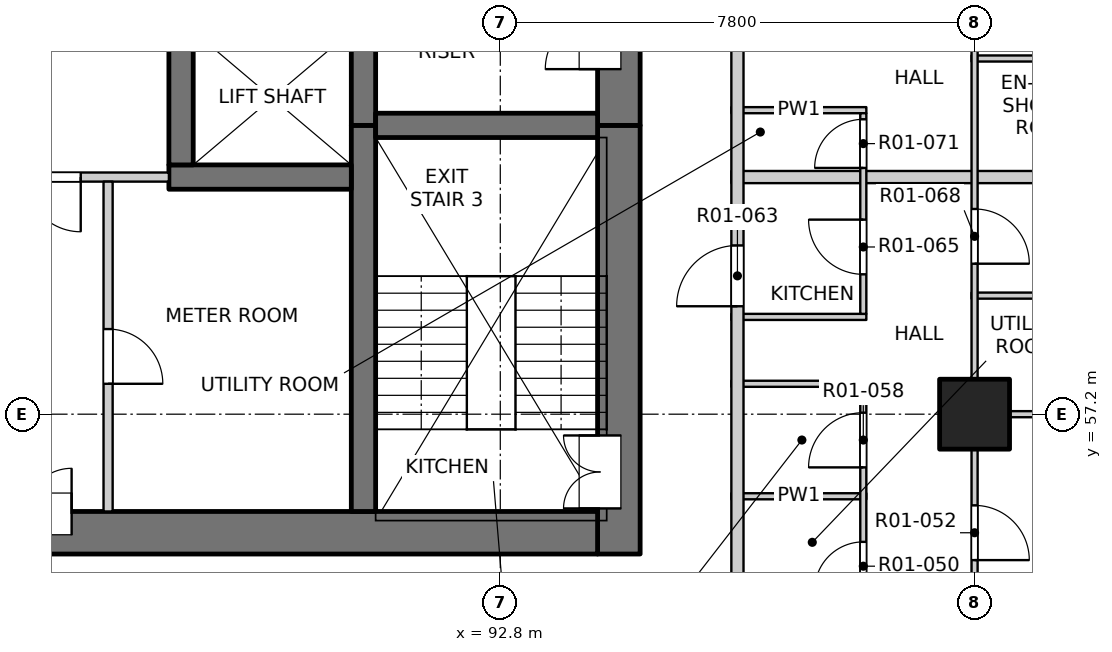
"""IFC4 building model, lengths in metres.
Left out: names, types, materials, properties, quantities, classifications, styles, units other than length and angle.
Written with IfcOpenShell. Run it as: python <this file> out.ifc"""

import sys

from ifc_helpers import new_model, si_unit, direction, frame, frame_2d, origin, origin_2d, place, context, subcontext, project, spatial, rectangle, extrude, element, fill, save


model = new_model("IFC4")
c1 = context("Model", 3, precision=1e-05, world=origin(), true_north=direction((0.0, 1.0)))
c2 = subcontext(c1, "Body", "Model", "MODEL_VIEW")
j1 = project(units=[si_unit("LENGTHUNIT", "METRE"), si_unit("PLANEANGLEUNIT", "RADIAN")], contexts=[c1])
p1 = place(None, origin())
s1 = spatial("IfcSite", under=j1, at=p1, CompositionType="ELEMENT")
p2 = place(p1, origin())
s2 = spatial("IfcBuilding", under=s1, at=p2, CompositionType="ELEMENT")
p3 = place(p2, frame((0.0, 0.0, 26.3)))
s3 = spatial("IfcBuildingStorey", under=s2, at=p3, CompositionType="ELEMENT", Elevation=26.3)
p4 = place(p3, frame((100.6, 57.2, -0.25), z_axis=(0.0, 0.0, 1.0), x_axis=(1.0, 0.0, 0.0)))
e1 = element("IfcColumn", 1, at=p4, inside=s3, PredefinedType="COLUMN", context=c2, shape_type="SweptSolid", body=[
    extrude(rectangle(XDim=1.15, YDim=1.15, at=origin_2d()), origin(), (0.0, 0.0, 1.0), 3.4),
])
p5 = place(p3, frame((94.75, 54.9, -0.25), z_axis=(0.0, 0.0, 1.0), x_axis=(0.0, 1.0, 0.0)))
e2 = element("IfcWall", 2, at=p5, inside=s3, PredefinedType="SOLIDWALL", context=c2, shape_type="SweptSolid", body=[
    extrude(rectangle(XDim=7.05, YDim=0.7, at=frame_2d((3.525, 0.0))), origin(), (0.0, 0.0, 1.0), 3.4),
])
p6 = place(p5, frame((0.75, 0.0, 0.25)))
e3 = element("IfcOpeningElement", 3, at=p6, cuts=e2, PredefinedType="OPENING", context=c2, shape_type="SweptSolid", body=[
    extrude(rectangle(XDim=1.2, YDim=2.1, at=frame_2d((0.6, 1.05))), frame((0.0, 0.36, 0.0), z_axis=(0.0, -1.0, 0.0), x_axis=(1.0, 0.0, 0.0)), (0.0, 0.0, 1.0), 0.72),
])
p7 = place(p3, frame((94.75, 61.95, -0.25), z_axis=(0.0, 0.0, 1.0), x_axis=(0.0, 1.0, 0.0)))
e4 = element("IfcWall", 4, at=p7, inside=s3, PredefinedType="SOLIDWALL", context=c2, shape_type="SweptSolid", body=[
    extrude(rectangle(XDim=15.35, YDim=0.7, at=frame_2d((7.675, 0.0))), origin(), (0.0, 0.0, 1.0), 3.4),
])
p8 = place(p7, frame((0.925, 0.0, 0.25)))
e5 = element("IfcOpeningElement", 5, at=p8, cuts=e4, PredefinedType="OPENING", context=c2, shape_type="SweptSolid", body=[
    extrude(rectangle(XDim=0.9, YDim=2.1, at=frame_2d((0.45, 1.05))), frame((0.0, 0.36, 0.0), z_axis=(0.0, -1.0, 0.0), x_axis=(1.0, 0.0, 0.0)), (0.0, 0.0, 1.0), 0.72),
])
p9 = place(p7, frame((6.8, 0.0, 0.25)))
e6 = element("IfcOpeningElement", 6, at=p9, cuts=e4, PredefinedType="OPENING", context=c2, shape_type="SweptSolid", body=[
    extrude(rectangle(XDim=0.9, YDim=2.1, at=frame_2d((0.45, 1.05))), frame((0.0, 0.36, 0.0), z_axis=(0.0, -1.0, 0.0), x_axis=(1.0, 0.0, 0.0)), (0.0, 0.0, 1.0), 0.72),
])
p10 = place(p7, frame((13.1, 0.0, 0.25)))
e7 = element("IfcOpeningElement", 7, at=p10, cuts=e4, PredefinedType="OPENING", context=c2, shape_type="SweptSolid", body=[
    extrude(rectangle(XDim=0.9, YDim=2.1, at=frame_2d((0.45, 1.05))), frame((0.0, 0.36, 0.0), z_axis=(0.0, -1.0, 0.0), x_axis=(1.0, 0.0, 0.0)), (0.0, 0.0, 1.0), 0.72),
])
p11 = place(p3, frame((75.6, 55.25, -0.25), z_axis=(0.0, 0.0, 1.0), x_axis=(1.0, 0.0, 0.0)))
e8 = element("IfcWall", 8, at=p11, inside=s3, PredefinedType="SOLIDWALL", context=c2, shape_type="SweptSolid", body=[
    extrude(rectangle(XDim=18.8, YDim=0.7, at=frame_2d((9.4, 0.0))), origin(), (0.0, 0.0, 1.0), 3.4),
])
p12 = place(p11, frame((8.65, 0.0, 0.25)))
e9 = element("IfcOpeningElement", 9, at=p12, cuts=e8, PredefinedType="OPENING", context=c2, shape_type="SweptSolid", body=[
    extrude(rectangle(XDim=1.5, YDim=2.1, at=frame_2d((0.75, 1.05))), frame((0.0, 0.36, 0.0), z_axis=(0.0, -1.0, 0.0), x_axis=(1.0, 0.0, 0.0)), (0.0, 0.0, 1.0), 0.72),
])
p13 = place(p3, frame((90.55, 55.6, -0.25), z_axis=(0.0, 0.0, 1.0), x_axis=(0.0, 1.0, 0.0)))
e10 = element("IfcWall", 10, at=p13, inside=s3, PredefinedType="SOLIDWALL", context=c2, shape_type="SweptSolid", body=[
    extrude(rectangle(XDim=6.35, YDim=0.4, at=frame_2d((3.175, 0.0))), origin(), (0.0, 0.0, 1.0), 3.4),
])
p14 = place(p3, frame((90.55, 61.95, -0.25), z_axis=(0.0, 0.0, 1.0), x_axis=(0.0, 1.0, 0.0)))
e11 = element("IfcWall", 11, at=p14, inside=s3, PredefinedType="SOLIDWALL", context=c2, shape_type="SweptSolid", body=[
    extrude(rectangle(XDim=15.35, YDim=0.4, at=frame_2d((7.675, 0.0))), origin(), (0.0, 0.0, 1.0), 3.4),
])
p15 = place(p3, frame((87.35, 61.1, -0.25), z_axis=(0.0, 0.0, 1.0), x_axis=(1.0, 0.0, 0.0)))
e12 = element("IfcWall", 12, at=p15, inside=s3, PredefinedType="SOLIDWALL", context=c2, shape_type="SweptSolid", body=[
    extrude(rectangle(XDim=3.0, YDim=0.4, at=frame_2d((1.5, 0.0))), origin(), (0.0, 0.0, 1.0), 3.4),
])
p16 = place(p3, frame((87.55, 61.3, -0.25), z_axis=(0.0, 0.0, 1.0), x_axis=(0.0, 1.0, 0.0)))
e13 = element("IfcWall", 13, at=p16, inside=s3, PredefinedType="SOLIDWALL", context=c2, shape_type="SweptSolid", body=[
    extrude(rectangle(XDim=2.2, YDim=0.4, at=frame_2d((1.1, 0.0))), origin(), (0.0, 0.0, 1.0), 3.4),
])
p17 = place(p3, frame((90.75, 61.95, -0.25), z_axis=(0.0, 0.0, 1.0), x_axis=(1.0, 0.0, 0.0)))
e14 = element("IfcWall", 14, at=p17, inside=s3, PredefinedType="SOLIDWALL", context=c2, shape_type="SweptSolid", body=[
    extrude(rectangle(XDim=3.65, YDim=0.4, at=frame_2d((1.825, 0.0))), origin(), (0.0, 0.0, 1.0), 3.4),
])
p18 = place(p3, frame((96.6, 55.85, 0.0), z_axis=(0.0, 0.0, 1.0), x_axis=(1.0, 0.0, 0.0)))
e15 = element("IfcWall", 15, at=p18, inside=s3, PredefinedType="PARTITIONING", context=c2, shape_type="SweptSolid", body=[
    extrude(rectangle(XDim=2.22, YDim=0.1, at=frame_2d((1.11, 0.0))), origin(), (0.0, 0.0, 1.0), 3.15),
])
p19 = place(p3, frame((100.55, 57.2, 0.0), z_axis=(0.0, 0.0, 1.0), x_axis=(1.0, 0.0, 0.0)))
e16 = element("IfcWall", 16, at=p19, inside=s3, PredefinedType="PARTITIONING", context=c2, shape_type="SweptSolid", body=[
    extrude(rectangle(XDim=7.55, YDim=0.1, at=frame_2d((3.775, 0.0))), origin(), (0.0, 0.0, 1.0), 2.55),
])
for number, where, z_axis, x_axis in (
    (17, (96.6, 57.7, 0.0), (0.0, 0.0, 1.0), (1.0, 0.0, 0.0)),
    (18, (96.6, 58.8, 0.0), (0.0, 0.0, 1.0), (1.0, 0.0, 0.0)),
):
    element("IfcWall", number, at=place(p3, frame(where, z_axis=z_axis, x_axis=x_axis)), inside=s3, PredefinedType="PARTITIONING", context=c2, shape_type="SweptSolid", body=[
        extrude(rectangle(XDim=2.22, YDim=0.1, at=frame_2d((1.11, 0.0))), origin(), (0.0, 0.0, 1.0), 3.15),
    ])
p20 = place(p3, frame((100.55, 59.15, 0.0), z_axis=(0.0, 0.0, 1.0), x_axis=(1.0, 0.0, 0.0)))
e19 = element("IfcWall", 19, at=p20, inside=s3, PredefinedType="PARTITIONING", context=c2, shape_type="SweptSolid", body=[
    extrude(rectangle(XDim=3.55, YDim=0.1, at=frame_2d((1.775, 0.0))), origin(), (0.0, 0.0, 1.0), 3.15),
])
p21 = place(p3, frame((82.65, 61.1, 0.0), z_axis=(0.0, 0.0, 1.0), x_axis=(1.0, 0.0, 0.0)))
e20 = element("IfcWall", 20, at=p21, inside=s3, PredefinedType="PARTITIONING", context=c2, shape_type="SweptSolid", body=[
    extrude(rectangle(XDim=4.7, YDim=0.15, at=frame_2d((2.35, 0.0))), origin(), (0.0, 0.0, 1.0), 3.15),
])
p22 = place(p21, frame((1.45, 0.0, 0.0)))
e21 = element("IfcOpeningElement", 21, at=p22, cuts=e20, PredefinedType="OPENING", context=c2, shape_type="SweptSolid", body=[
    extrude(rectangle(XDim=1.8, YDim=2.1, at=frame_2d((0.9, 1.05))), frame((0.0, 0.085, 0.0), z_axis=(0.0, -1.0, 0.0), x_axis=(1.0, 0.0, 0.0)), (0.0, 0.0, 1.0), 0.17),
])
p23 = place(p3, frame((96.6, 61.1, 0.0), z_axis=(0.0, 0.0, 1.0), x_axis=(1.0, 0.0, 0.0)))
e22 = element("IfcWall", 22, at=p23, inside=s3, PredefinedType="PARTITIONING", context=c2, shape_type="SweptSolid", body=[
    extrude(rectangle(XDim=11.5, YDim=0.2, at=frame_2d((5.75, 0.0))), origin(), (0.0, 0.0, 1.0), 3.15),
])
p24 = place(p3, frame((96.6, 62.2, 0.0), z_axis=(0.0, 0.0, 1.0), x_axis=(1.0, 0.0, 0.0)))
e23 = element("IfcWall", 23, at=p24, inside=s3, PredefinedType="PARTITIONING", context=c2, shape_type="SweptSolid", body=[
    extrude(rectangle(XDim=2.22, YDim=0.1, at=frame_2d((1.11, 0.0))), origin(), (0.0, 0.0, 1.0), 3.15),
])
p25 = place(p3, frame((100.55, 63.05, 0.0), z_axis=(0.0, 0.0, 1.0), x_axis=(1.0, 0.0, 0.0)))
e24 = element("IfcWall", 24, at=p25, inside=s3, PredefinedType="PARTITIONING", context=c2, shape_type="SweptSolid", body=[
    extrude(rectangle(XDim=3.7, YDim=0.1, at=frame_2d((1.85, 0.0))), origin(), (0.0, 0.0, 1.0), 3.15),
])
p26 = place(p3, frame((86.35, 55.6, 0.0), z_axis=(0.0, 0.0, 1.0), x_axis=(0.0, 1.0, 0.0)))
e25 = element("IfcWall", 25, at=p26, inside=s3, PredefinedType="PARTITIONING", context=c2, shape_type="SweptSolid", body=[
    extrude(rectangle(XDim=5.425, YDim=0.15, at=frame_2d((2.712, 0.0))), origin(), (0.0, 0.0, 1.0), 3.15),
])
p27 = place(p26, frame((2.1, 0.0, 0.0)))
e26 = element("IfcOpeningElement", 26, at=p27, cuts=e25, PredefinedType="OPENING", context=c2, shape_type="SweptSolid", body=[
    extrude(rectangle(XDim=0.9, YDim=2.1, at=frame_2d((0.45, 1.05))), frame((0.0, 0.085, 0.0), z_axis=(0.0, -1.0, 0.0), x_axis=(1.0, 0.0, 0.0)), (0.0, 0.0, 1.0), 0.17),
])
p28 = place(p3, frame((96.7, 53.4, 0.0), z_axis=(0.0, 0.0, 1.0), x_axis=(0.0, 1.0, 0.0)))
e27 = element("IfcWall", 27, at=p28, inside=s3, PredefinedType="PARTITIONING", context=c2, shape_type="SweptSolid", body=[
    extrude(rectangle(XDim=31.0, YDim=0.2, at=frame_2d((15.5, 0.0))), origin(), (0.0, 0.0, 1.0), 3.15),
])
p29 = place(p28, frame((5.575, 0.0, 0.0)))
e28 = element("IfcOpeningElement", 28, at=p29, cuts=e27, PredefinedType="OPENING", context=c2, shape_type="SweptSolid", body=[
    extrude(rectangle(XDim=1.0, YDim=2.1, at=frame_2d((0.5, 1.05))), frame((0.0, 0.11, 0.0), z_axis=(0.0, -1.0, 0.0), x_axis=(1.0, 0.0, 0.0)), (0.0, 0.0, 1.0), 0.22),
])
p30 = place(p28, frame((10.075, 0.0, 0.0)))
e29 = element("IfcOpeningElement", 29, at=p30, cuts=e27, PredefinedType="OPENING", context=c2, shape_type="SweptSolid", body=[
    extrude(rectangle(XDim=1.0, YDim=2.1, at=frame_2d((0.5, 1.05))), frame((0.0, 0.11, 0.0), z_axis=(0.0, -1.0, 0.0), x_axis=(1.0, 0.0, 0.0)), (0.0, 0.0, 1.0), 0.22),
])
p31 = place(p28, frame((28.975, 0.0, 0.0)))
e30 = element("IfcOpeningElement", 30, at=p31, cuts=e27, PredefinedType="OPENING", context=c2, shape_type="SweptSolid", body=[
    extrude(rectangle(XDim=1.0, YDim=2.1, at=frame_2d((0.5, 1.05))), frame((0.0, 0.11, 0.0), z_axis=(0.0, -1.0, 0.0), x_axis=(1.0, 0.0, 0.0)), (0.0, 0.0, 1.0), 0.22),
])
p32 = place(p3, frame((98.77, 45.55, 0.0), z_axis=(0.0, 0.0, 1.0), x_axis=(0.0, 1.0, 0.0)))
e31 = element("IfcWall", 31, at=p32, inside=s3, PredefinedType="PARTITIONING", context=c2, shape_type="SweptSolid", body=[
    extrude(rectangle(XDim=12.1, YDim=0.1, at=frame_2d((6.05, 0.0))), origin(), (0.0, 0.0, 1.0), 3.15),
])
p33 = place(p32, frame((0.7, 0.0, 0.0)))
e32 = element("IfcOpeningElement", 32, at=p33, cuts=e31, PredefinedType="OPENING", context=c2, shape_type="SweptSolid", body=[
    extrude(rectangle(XDim=0.9, YDim=2.1, at=frame_2d((0.45, 1.05))), frame((0.0, 0.06, 0.0), z_axis=(0.0, -1.0, 0.0), x_axis=(1.0, 0.0, 0.0)), (0.0, 0.0, 1.0), 0.12),
])
p34 = place(p32, frame((3.325, 0.0, 0.0)))
e33 = element("IfcOpeningElement", 33, at=p34, cuts=e31, PredefinedType="OPENING", context=c2, shape_type="SweptSolid", body=[
    extrude(rectangle(XDim=0.8, YDim=2.1, at=frame_2d((0.4, 1.05))), frame((0.0, 0.06, 0.0), z_axis=(0.0, -1.0, 0.0), x_axis=(1.0, 0.0, 0.0)), (0.0, 0.0, 1.0), 0.12),
])
p35 = place(p32, frame((6.15, 0.0, 0.0)))
e34 = element("IfcOpeningElement", 34, at=p35, cuts=e31, PredefinedType="OPENING", context=c2, shape_type="SweptSolid", body=[
    extrude(rectangle(XDim=0.8, YDim=2.1, at=frame_2d((0.4, 1.05))), frame((0.0, 0.06, 0.0), z_axis=(0.0, -1.0, 0.0), x_axis=(1.0, 0.0, 0.0)), (0.0, 0.0, 1.0), 0.12),
])
p36 = place(p32, frame((8.75, 0.0, 0.0)))
e35 = element("IfcOpeningElement", 35, at=p36, cuts=e31, PredefinedType="OPENING", context=c2, shape_type="SweptSolid", body=[
    extrude(rectangle(XDim=0.8, YDim=2.1, at=frame_2d((0.4, 1.05))), frame((0.0, 0.06, 0.0), z_axis=(0.0, -1.0, 0.0), x_axis=(1.0, 0.0, 0.0)), (0.0, 0.0, 1.0), 0.12),
])
p37 = place(p32, frame((10.775, 0.0, 0.0)))
e36 = element("IfcOpeningElement", 36, at=p37, cuts=e31, PredefinedType="OPENING", context=c2, shape_type="SweptSolid", body=[
    extrude(rectangle(XDim=0.9, YDim=2.1, at=frame_2d((0.45, 1.05))), frame((0.0, 0.06, 0.0), z_axis=(0.0, -1.0, 0.0), x_axis=(1.0, 0.0, 0.0)), (0.0, 0.0, 1.0), 0.12),
])
p38 = place(p3, frame((98.77, 58.85, 0.0), z_axis=(0.0, 0.0, 1.0), x_axis=(0.0, 1.0, 0.0)))
e37 = element("IfcWall", 37, at=p38, inside=s3, PredefinedType="PARTITIONING", context=c2, shape_type="SweptSolid", body=[
    extrude(rectangle(XDim=3.3, YDim=0.1, at=frame_2d((1.65, 0.0))), origin(), (0.0, 0.0, 1.0), 3.15),
])
p39 = place(p38, frame((0.65, 0.0, 0.0)))
e38 = element("IfcOpeningElement", 38, at=p39, cuts=e37, PredefinedType="OPENING", context=c2, shape_type="SweptSolid", body=[
    extrude(rectangle(XDim=0.9, YDim=2.1, at=frame_2d((0.45, 1.05))), frame((0.0, 0.06, 0.0), z_axis=(0.0, -1.0, 0.0), x_axis=(1.0, 0.0, 0.0)), (0.0, 0.0, 1.0), 0.12),
])
p40 = place(p38, frame((2.4, 0.0, 0.0)))
e39 = element("IfcOpeningElement", 39, at=p40, cuts=e37, PredefinedType="OPENING", context=c2, shape_type="SweptSolid", body=[
    extrude(rectangle(XDim=0.8, YDim=2.1, at=frame_2d((0.4, 1.05))), frame((0.0, 0.06, 0.0), z_axis=(0.0, -1.0, 0.0), x_axis=(1.0, 0.0, 0.0)), (0.0, 0.0, 1.0), 0.12),
])
p41 = place(p3, frame((100.6, 49.4, 0.0), z_axis=(0.0, 0.0, 1.0), x_axis=(0.0, 1.0, 0.0)))
e40 = element("IfcWall", 40, at=p41, inside=s3, PredefinedType="PARTITIONING", context=c2, shape_type="SweptSolid", body=[
    extrude(rectangle(XDim=31.2, YDim=0.1, at=frame_2d((15.6, 0.0))), origin(), (0.0, 0.0, 1.0), 3.15),
])
p42 = place(p41, frame((1.5, 0.0, 0.0)))
e41 = element("IfcOpeningElement", 41, at=p42, cuts=e40, PredefinedType="OPENING", context=c2, shape_type="SweptSolid", body=[
    extrude(rectangle(XDim=0.9, YDim=2.1, at=frame_2d((0.45, 1.05))), frame((0.0, 0.06, 0.0), z_axis=(0.0, -1.0, 0.0), x_axis=(1.0, 0.0, 0.0)), (0.0, 0.0, 1.0), 0.12),
])
p43 = place(p41, frame((5.4, 0.0, 0.0)))
e42 = element("IfcOpeningElement", 42, at=p43, cuts=e40, PredefinedType="OPENING", context=c2, shape_type="SweptSolid", body=[
    extrude(rectangle(XDim=0.9, YDim=2.1, at=frame_2d((0.45, 1.05))), frame((0.0, 0.06, 0.0), z_axis=(0.0, -1.0, 0.0), x_axis=(1.0, 0.0, 0.0)), (0.0, 0.0, 1.0), 0.12),
])
p44 = place(p41, frame((10.275, 0.0, 0.0)))
e43 = element("IfcOpeningElement", 43, at=p44, cuts=e40, PredefinedType="OPENING", context=c2, shape_type="SweptSolid", body=[
    extrude(rectangle(XDim=0.9, YDim=2.1, at=frame_2d((0.45, 1.05))), frame((0.0, 0.06, 0.0), z_axis=(0.0, -1.0, 0.0), x_axis=(1.0, 0.0, 0.0)), (0.0, 0.0, 1.0), 0.12),
])
p45 = place(p41, frame((14.0, 0.0, 0.0)))
e44 = element("IfcOpeningElement", 44, at=p45, cuts=e40, PredefinedType="OPENING", context=c2, shape_type="SweptSolid", body=[
    extrude(rectangle(XDim=0.9, YDim=2.1, at=frame_2d((0.45, 1.05))), frame((0.0, 0.06, 0.0), z_axis=(0.0, -1.0, 0.0), x_axis=(1.0, 0.0, 0.0)), (0.0, 0.0, 1.0), 0.12),
])
p46 = place(p41, frame((17.1, 0.0, 0.0)))
e45 = element("IfcOpeningElement", 45, at=p46, cuts=e40, PredefinedType="OPENING", context=c2, shape_type="SweptSolid", body=[
    extrude(rectangle(XDim=0.9, YDim=2.1, at=frame_2d((0.45, 1.05))), frame((0.0, 0.06, 0.0), z_axis=(0.0, -1.0, 0.0), x_axis=(1.0, 0.0, 0.0)), (0.0, 0.0, 1.0), 0.12),
])
p47 = place(p41, frame((21.8, 0.0, 0.0)))
e46 = element("IfcOpeningElement", 46, at=p47, cuts=e40, PredefinedType="OPENING", context=c2, shape_type="SweptSolid", body=[
    extrude(rectangle(XDim=0.9, YDim=2.1, at=frame_2d((0.45, 1.05))), frame((0.0, 0.06, 0.0), z_axis=(0.0, -1.0, 0.0), x_axis=(1.0, 0.0, 0.0)), (0.0, 0.0, 1.0), 0.12),
])
p48 = place(p41, frame((24.9, 0.0, 0.0)))
e47 = element("IfcOpeningElement", 47, at=p48, cuts=e40, PredefinedType="OPENING", context=c2, shape_type="SweptSolid", body=[
    extrude(rectangle(XDim=0.9, YDim=2.1, at=frame_2d((0.45, 1.05))), frame((0.0, 0.06, 0.0), z_axis=(0.0, -1.0, 0.0), x_axis=(1.0, 0.0, 0.0)), (0.0, 0.0, 1.0), 0.12),
])
p49 = place(p41, frame((28.8, 0.0, 0.0)))
e48 = element("IfcOpeningElement", 48, at=p49, cuts=e40, PredefinedType="OPENING", context=c2, shape_type="SweptSolid", body=[
    extrude(rectangle(XDim=0.9, YDim=2.1, at=frame_2d((0.45, 1.05))), frame((0.0, 0.06, 0.0), z_axis=(0.0, -1.0, 0.0), x_axis=(1.0, 0.0, 0.0)), (0.0, 0.0, 1.0), 0.12),
])
p50 = place(p36, origin())
e49 = element("IfcDoor", 49, at=p50, inside=s3, OperationType="SINGLE_SWING_LEFT", PredefinedType="DOOR", context=c2, shape_type="SweptSolid", body=[
    extrude(rectangle(XDim=0.8, YDim=2.1, at=frame_2d((0.4, 1.05))), frame((0.0, 0.025, 0.0), z_axis=(0.0, -1.0, 0.0), x_axis=(1.0, 0.0, 0.0)), (0.0, 0.0, 1.0), 0.05),
])
fill(e35, e49)
p51 = place(p12, origin())
e50 = element("IfcDoor", 50, at=p51, inside=s3, OperationType="DOUBLE_DOOR_SINGLE_SWING", PredefinedType="DOOR", context=c2, shape_type="SweptSolid", body=[
    extrude(rectangle(XDim=1.5, YDim=2.1, at=frame_2d((0.75, 1.05))), frame((0.0, 0.335, 0.0), z_axis=(0.0, -1.0, 0.0), x_axis=(1.0, 0.0, 0.0)), (0.0, 0.0, 1.0), 0.05),
])
fill(e9, e50)
p52 = place(p43, origin())
e51 = element("IfcDoor", 51, at=p52, inside=s3, OperationType="SINGLE_SWING_RIGHT", PredefinedType="DOOR", context=c2, shape_type="SweptSolid", body=[
    extrude(rectangle(XDim=0.9, YDim=2.1, at=frame_2d((0.45, 1.05))), frame((0.0, 0.025, 0.0), z_axis=(0.0, -1.0, 0.0), x_axis=(1.0, 0.0, 0.0)), (0.0, 0.0, 1.0), 0.05),
])
fill(e42, e51)
p53 = place(p6, origin())
e52 = element("IfcDoor", 52, at=p53, inside=s3, OperationType="DOUBLE_DOOR_SINGLE_SWING", PredefinedType="DOOR", context=c2, shape_type="SweptSolid", body=[
    extrude(rectangle(XDim=1.2, YDim=2.1, at=frame_2d((0.6, 1.05))), frame((0.0, 0.335, 0.0), z_axis=(0.0, -1.0, 0.0), x_axis=(1.0, 0.0, 0.0)), (0.0, 0.0, 1.0), 0.05),
])
fill(e3, e52)
p54 = place(p37, origin())
e53 = element("IfcDoor", 53, at=p54, inside=s3, OperationType="SINGLE_SWING_LEFT", PredefinedType="DOOR", context=c2, shape_type="SweptSolid", body=[
    extrude(rectangle(XDim=0.9, YDim=2.1, at=frame_2d((0.45, 1.05))), frame((0.0, 0.025, 0.0), z_axis=(0.0, -1.0, 0.0), x_axis=(1.0, 0.0, 0.0)), (0.0, 0.0, 1.0), 0.05),
])
fill(e36, e53)
p55 = place(p27, origin())
e54 = element("IfcDoor", 54, at=p55, inside=s3, OperationType="SINGLE_SWING_RIGHT", PredefinedType="DOOR", context=c2, shape_type="SweptSolid", body=[
    extrude(rectangle(XDim=0.9, YDim=2.1, at=frame_2d((0.45, 1.05))), frame((0.0, 0.025, 0.0), z_axis=(0.0, -1.0, 0.0), x_axis=(1.0, 0.0, 0.0)), (0.0, 0.0, 1.0), 0.05),
])
fill(e26, e54)
p56 = place(p29, origin())
e55 = element("IfcDoor", 55, at=p56, inside=s3, OperationType="SINGLE_SWING_LEFT", PredefinedType="DOOR", context=c2, shape_type="SweptSolid", body=[
    extrude(rectangle(XDim=1.0, YDim=2.1, at=frame_2d((0.5, 1.05))), frame((0.0, 0.025, 0.0), z_axis=(0.0, -1.0, 0.0), x_axis=(1.0, 0.0, 0.0)), (0.0, 0.0, 1.0), 0.05),
])
fill(e28, e55)
p57 = place(p39, origin())
e56 = element("IfcDoor", 56, at=p57, inside=s3, OperationType="SINGLE_SWING_RIGHT", PredefinedType="DOOR", context=c2, shape_type="SweptSolid", body=[
    extrude(rectangle(XDim=0.9, YDim=2.1, at=frame_2d((0.45, 1.05))), frame((0.0, 0.025, 0.0), z_axis=(0.0, -1.0, 0.0), x_axis=(1.0, 0.0, 0.0)), (0.0, 0.0, 1.0), 0.05),
])
fill(e38, e56)
p58 = place(p44, origin())
e57 = element("IfcDoor", 57, at=p58, inside=s3, OperationType="SINGLE_SWING_RIGHT", PredefinedType="DOOR", context=c2, shape_type="SweptSolid", body=[
    extrude(rectangle(XDim=0.9, YDim=2.1, at=frame_2d((0.45, 1.05))), frame((0.0, 0.025, 0.0), z_axis=(0.0, -1.0, 0.0), x_axis=(1.0, 0.0, 0.0)), (0.0, 0.0, 1.0), 0.05),
])
fill(e43, e57)
p59 = place(p22, origin())
e58 = element("IfcDoor", 58, at=p59, inside=s3, OperationType="DOUBLE_DOOR_SINGLE_SWING", PredefinedType="DOOR", context=c2, shape_type="SweptSolid", body=[
    extrude(rectangle(XDim=1.8, YDim=2.1, at=frame_2d((0.9, 1.05))), frame((0.0, 0.025, 0.0), z_axis=(0.0, -1.0, 0.0), x_axis=(1.0, 0.0, 0.0)), (0.0, 0.0, 1.0), 0.05),
])
fill(e21, e58)
p60 = place(p40, origin())
e59 = element("IfcDoor", 59, at=p60, inside=s3, OperationType="SINGLE_SWING_LEFT", PredefinedType="DOOR", context=c2, shape_type="SweptSolid", body=[
    extrude(rectangle(XDim=0.8, YDim=2.1, at=frame_2d((0.4, 1.05))), frame((0.0, 0.025, 0.0), z_axis=(0.0, -1.0, 0.0), x_axis=(1.0, 0.0, 0.0)), (0.0, 0.0, 1.0), 0.05),
])
fill(e39, e59)
p61 = place(p8, origin())
e60 = element("IfcDoor", 60, at=p61, inside=s3, OperationType="SINGLE_SWING_LEFT", PredefinedType="DOOR", context=c2, shape_type="SweptSolid", body=[
    extrude(rectangle(XDim=0.9, YDim=2.1, at=frame_2d((0.45, 1.05))), frame((0.0, 0.335, 0.0), z_axis=(0.0, -1.0, 0.0), x_axis=(1.0, 0.0, 0.0)), (0.0, 0.0, 1.0), 0.05),
])
fill(e5, e60)
save(model, sys.argv[1])
